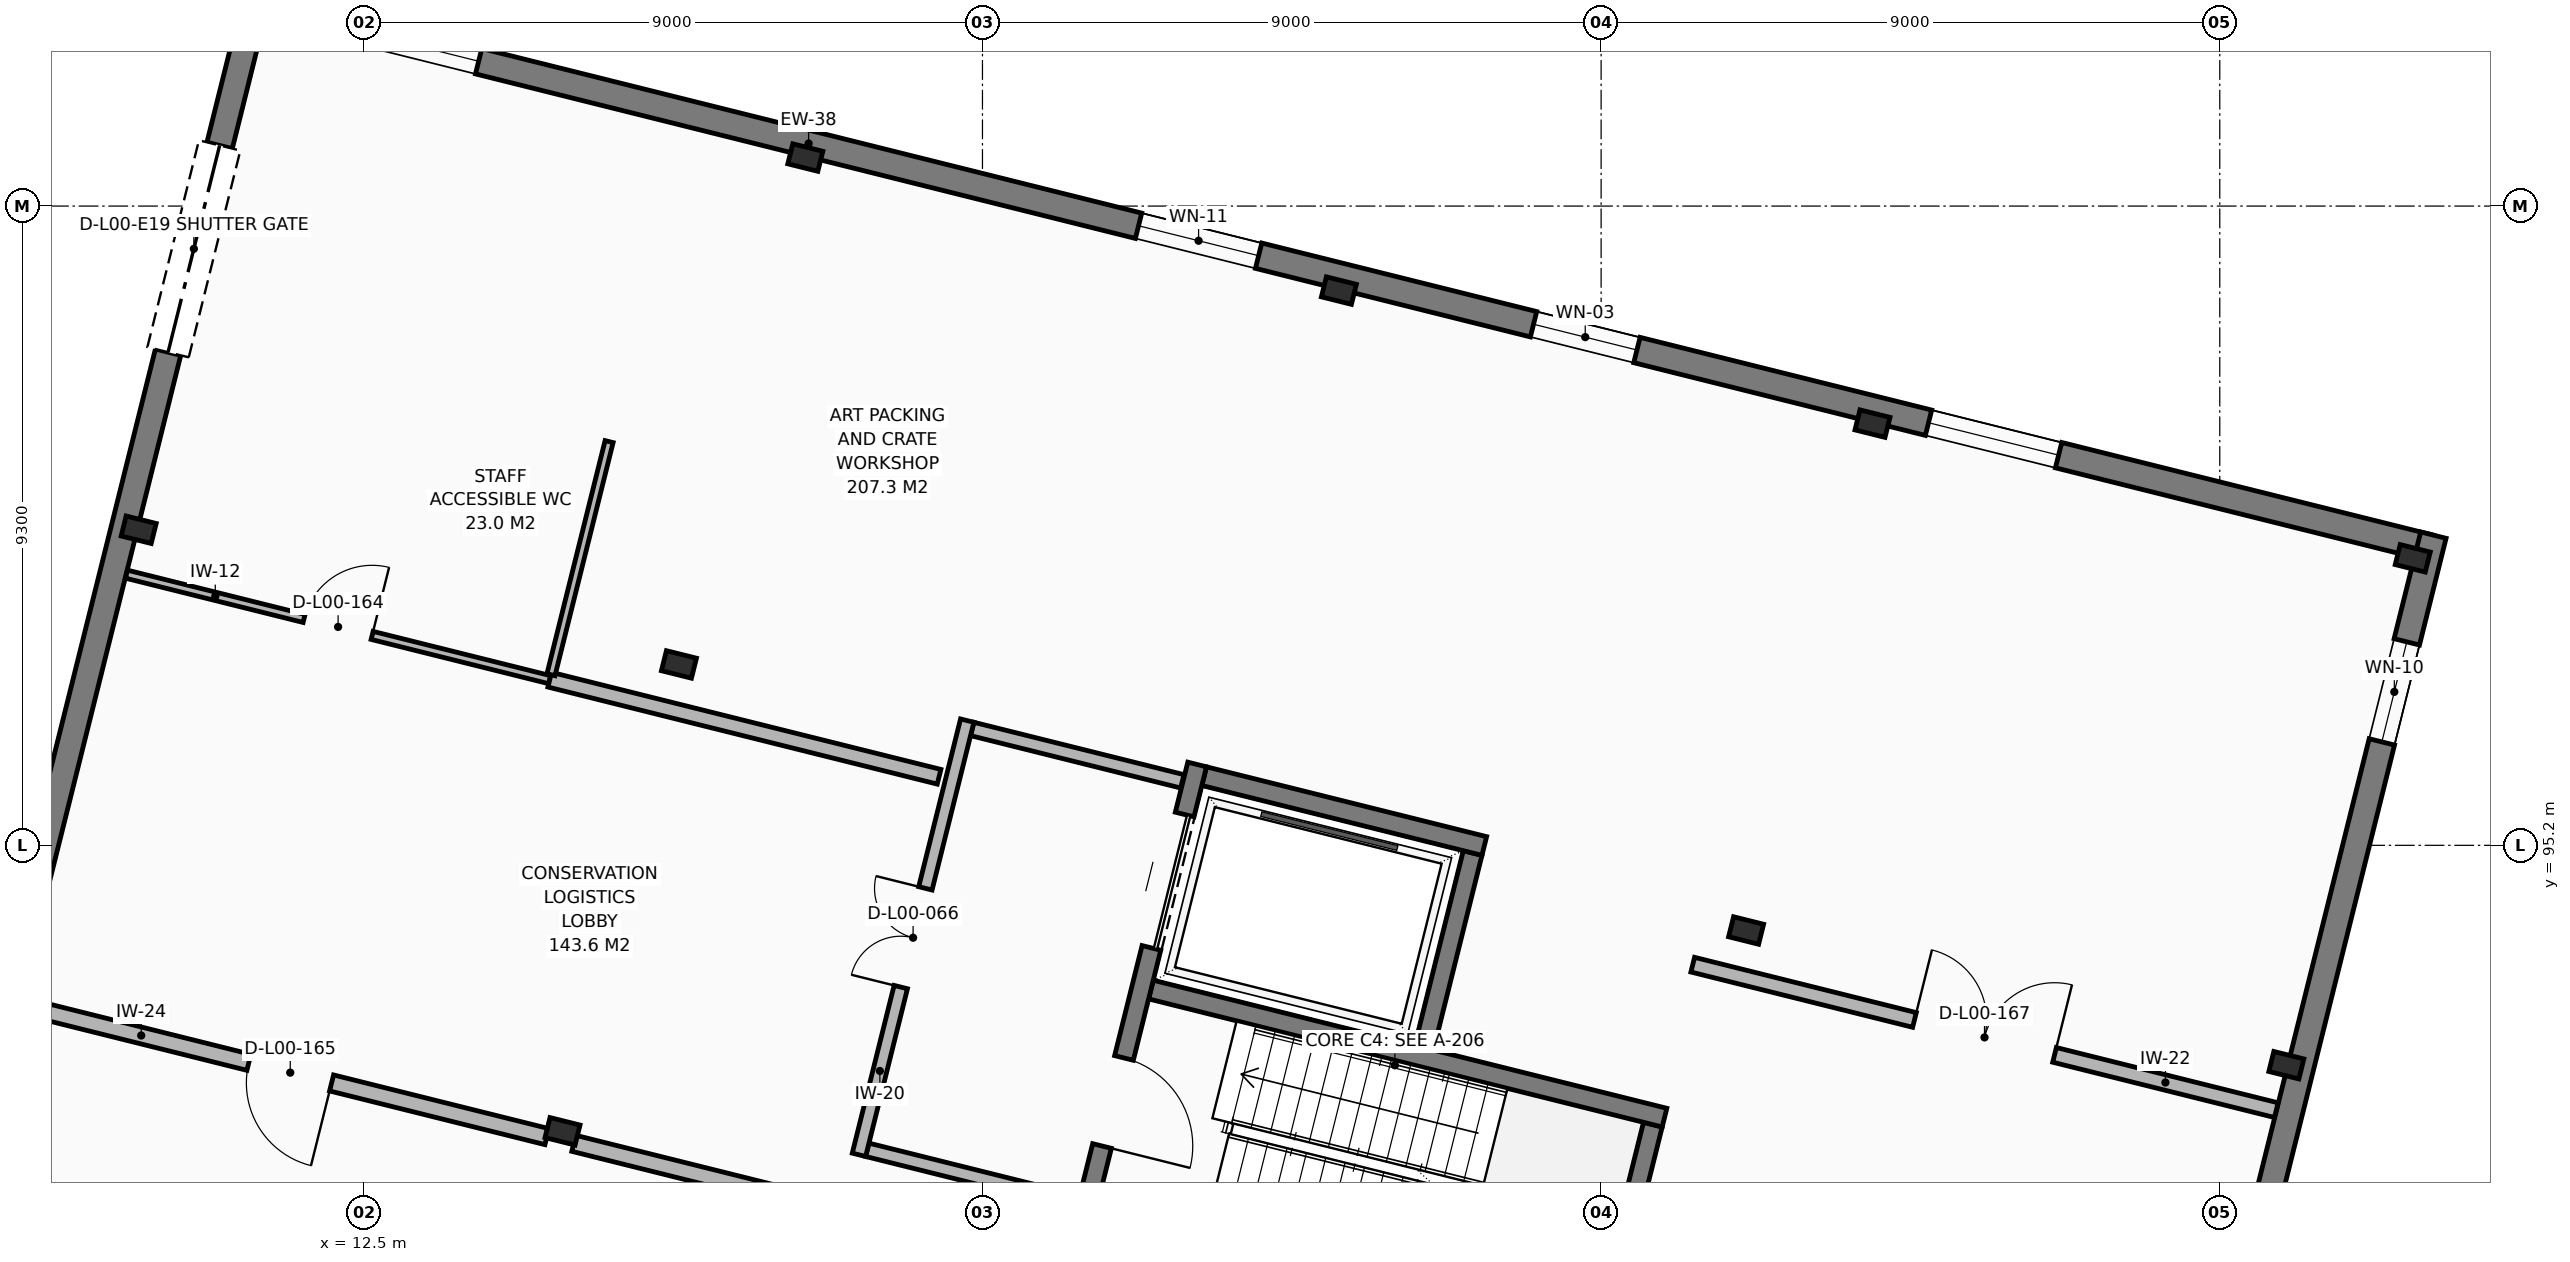
"""IFC4 building model, lengths in metres.
Left out: names, types, materials, properties, quantities, classifications, styles, units other than length and angle.
Written with IfcOpenShell. Run it as: python <this file> out.ifc"""

import sys

from ifc_helpers import new_model, si_unit, direction, frame, frame_2d, origin, origin_2d, place, context, subcontext, project, spatial, rectangle, i_section, extrude, element, fill, save


model = new_model("IFC4")
c1 = context("Model", 3, precision=1e-05, world=origin(), true_north=direction((0.0, 1.0)))
c2 = subcontext(c1, "Body", "Model", "MODEL_VIEW")
j1 = project(units=[si_unit("LENGTHUNIT", "METRE"), si_unit("PLANEANGLEUNIT", "RADIAN")], contexts=[c1])
p1 = place(None, origin())
s1 = spatial("IfcSite", under=j1, at=p1, CompositionType="ELEMENT")
p2 = place(p1, origin())
s2 = spatial("IfcBuilding", under=s1, at=p2, CompositionType="ELEMENT")
p3 = place(p2, origin())
s3 = spatial("IfcBuildingStorey", under=s2, at=p3, CompositionType="ELEMENT", Elevation=0.0)
for number, where, z_axis, x_axis in (
    (1, (9.225, 99.791, 0.0), (0.0, 0.0, 1.0), (0.97, -0.242, 0.0)),
    (2, (15.391, 91.039, 0.0), (0.0, 0.0, 1.0), (0.97, -0.242, 0.0)),
    (3, (17.084, 97.831, 0.0), (0.0, 0.0, 1.0), (0.97, -0.242, 0.0)),
    (4, (18.923, 105.206, 0.0), (0.0, 0.0, 1.0), (0.97, -0.242, 0.0)),
    (5, (26.685, 103.27, 0.0), (0.0, 0.0, 1.0), (0.97, -0.242, 0.0)),
    (6, (32.609, 93.961, 0.0), (0.0, 0.0, 1.0), (0.97, -0.242, 0.0)),
    (7, (34.448, 101.335, 0.0), (0.0, 0.0, 1.0), (0.97, -0.242, 0.0)),
    (8, (40.469, 92.001, 0.0), (0.0, 0.0, 1.0), (0.97, -0.242, 0.0)),
    (9, (42.307, 99.375, 0.0), (0.0, 0.0, 1.0), (0.97, -0.242, 0.0)),
):
    element("IfcColumn", number, at=place(p3, frame(where, z_axis=z_axis, x_axis=x_axis)), inside=s3, PredefinedType="COLUMN", context=c2, shape_type="SweptSolid", body=[
        extrude(i_section(OverallWidth=0.3, OverallDepth=0.45, WebThickness=0.014, FlangeThickness=0.026, FilletRadius=0.027, at=origin_2d()), origin(), (0.0, 0.0, 1.0), 5.1),
    ])
p4 = place(p3, frame((5.392, 85.287, 0.0), z_axis=(0.0, 0.0, 1.0), x_axis=(0.241923607661, 0.970295299409, 0.0)))
e10 = element("IfcWall", 10, at=p4, inside=s3, PredefinedType="SOLIDWALL", context=c2, shape_type="SweptSolid", body=[
    extrude(rectangle(XDim=22.81, YDim=0.38, at=frame_2d((11.405, 0.0))), origin(), (0.0, 0.0, 1.0), 4.88),
])
p5 = place(p4, frame((17.61, 0.0, 0.0)))
e11 = element("IfcOpeningElement", 11, at=p5, cuts=e10, PredefinedType="OPENING", context=c2, shape_type="SweptSolid", body=[
    extrude(rectangle(XDim=3.1, YDim=3.1, at=frame_2d((1.55, 1.55))), frame((0.0, 0.2, 0.0), z_axis=(0.0, -1.0, 0.0), x_axis=(1.0, 0.0, 0.0)), (0.0, 0.0, 1.0), 0.4),
])
p6 = place(p3, frame((10.726, 107.466, 0.0), z_axis=(0.0, 0.0, 1.0), x_axis=(0.970295504299, -0.2419227859, 0.0)))
e12 = element("IfcWall", 12, at=p6, inside=s3, PredefinedType="SOLIDWALL", context=c2, shape_type="SweptSolid", body=[
    extrude(rectangle(XDim=32.81, YDim=0.38, at=frame_2d((16.405, 0.0))), origin(), (0.0, 0.0, 1.0), 4.88),
])
p7 = place(p6, frame((1.6, 0.0, 0.85)))
e13 = element("IfcOpeningElement", 13, at=p7, cuts=e12, PredefinedType="OPENING", context=c2, shape_type="SweptSolid", body=[
    extrude(rectangle(XDim=1.95, YDim=1.5, at=frame_2d((0.975, 0.75))), frame((0.0, 0.2, 0.0), z_axis=(0.0, -1.0, 0.0), x_axis=(1.0, 0.0, 0.0)), (0.0, 0.0, 1.0), 0.4),
])
p8 = place(p6, frame((13.444, 0.0, 0.85)))
e14 = element("IfcOpeningElement", 14, at=p8, cuts=e12, PredefinedType="OPENING", context=c2, shape_type="SweptSolid", body=[
    extrude(rectangle(XDim=1.8, YDim=1.7, at=frame_2d((0.9, 0.85))), frame((0.0, 0.2, 0.0), z_axis=(0.0, -1.0, 0.0), x_axis=(1.0, 0.0, 0.0)), (0.0, 0.0, 1.0), 0.4),
])
p9 = place(p6, frame((19.366, 0.0, 0.85)))
e15 = element("IfcOpeningElement", 15, at=p9, cuts=e12, PredefinedType="OPENING", context=c2, shape_type="SweptSolid", body=[
    extrude(rectangle(XDim=1.55, YDim=1.5, at=frame_2d((0.775, 0.75))), frame((0.0, 0.2, 0.0), z_axis=(0.0, -1.0, 0.0), x_axis=(1.0, 0.0, 0.0)), (0.0, 0.0, 1.0), 0.4),
])
p10 = place(p6, frame((25.288, 0.0, 0.85)))
e16 = element("IfcOpeningElement", 16, at=p10, cuts=e12, PredefinedType="OPENING", context=c2, shape_type="SweptSolid", body=[
    extrude(rectangle(XDim=1.95, YDim=1.5, at=frame_2d((0.975, 0.75))), frame((0.0, 0.2, 0.0), z_axis=(0.0, -1.0, 0.0), x_axis=(1.0, 0.0, 0.0)), (0.0, 0.0, 1.0), 0.4),
])
p11 = place(p3, frame((42.608, 99.713, 0.0), z_axis=(0.0, 0.0, 1.0), x_axis=(-0.241914242385, -0.970297634405, 0.0)))
e17 = element("IfcWall", 17, at=p11, inside=s3, PredefinedType="SOLIDWALL", context=c2, shape_type="SweptSolid", body=[
    extrude(rectangle(XDim=14.978, YDim=0.38, at=frame_2d((7.489, 0.0))), origin(), (0.0, 0.0, 1.0), 4.88),
])
p12 = place(p11, frame((1.6, 0.0, 0.85)))
e18 = element("IfcOpeningElement", 18, at=p12, cuts=e17, PredefinedType="OPENING", context=c2, shape_type="SweptSolid", body=[
    extrude(rectangle(XDim=1.5, YDim=1.7, at=frame_2d((0.75, 0.85))), frame((0.0, 0.2, 0.0), z_axis=(0.0, -1.0, 0.0), x_axis=(1.0, 0.0, 0.0)), (0.0, 0.0, 1.0), 0.4),
])
p13 = place(p3, frame((30.508, 88.148, 0.0), z_axis=(0.0, 0.0, 1.0), x_axis=(0.241920098373, 0.970296174373, 0.0)))
e19 = element("IfcWall", 19, at=p13, inside=s3, PredefinedType="SHEAR", context=c2, shape_type="SweptSolid", body=[
    extrude(rectangle(XDim=3.08, YDim=0.28, at=frame_2d((1.54, 0.0))), origin(), (0.0, 0.0, 1.0), 4.88),
])
p14 = place(p3, frame((31.422, 91.239, 0.0), z_axis=(0.0, 0.0, 1.0), x_axis=(-0.970297102167, 0.241916377137, 0.0)))
e20 = element("IfcWall", 20, at=p14, inside=s3, PredefinedType="SHEAR", context=c2, shape_type="SweptSolid", body=[
    extrude(rectangle(XDim=7.7, YDim=0.28, at=frame_2d((3.85, 0.0))), origin(), (0.0, 0.0, 1.0), 4.88),
])
p15 = place(p3, frame((27.924, 92.255, 0.0), z_axis=(0.0, 0.0, 1.0), x_axis=(0.241886356621, 0.970304586447, 0.0)))
e21 = element("IfcWall", 21, at=p15, inside=s3, PredefinedType="SHEAR", context=c2, shape_type="SweptSolid", body=[
    extrude(rectangle(XDim=2.92, YDim=0.28, at=frame_2d((1.46, 0.0))), origin(), (0.0, 0.0, 1.0), 4.88),
])
p16 = place(p3, frame((28.8, 95.19, 0.0), z_axis=(0.0, 0.0, 1.0), x_axis=(-0.970292765557, 0.241933770084, 0.0)))
e22 = element("IfcWall", 22, at=p16, inside=s3, PredefinedType="SHEAR", context=c2, shape_type="SweptSolid", body=[
    extrude(rectangle(XDim=4.2, YDim=0.28, at=frame_2d((2.1, 0.0))), origin(), (0.0, 0.0, 1.0), 4.88),
])
p17 = place(p3, frame((24.623, 96.376, 0.0), z_axis=(0.0, 0.0, 1.0), x_axis=(-0.241922508616, -0.970295573434, 0.0)))
e23 = element("IfcWall", 23, at=p17, inside=s3, PredefinedType="SHEAR", context=c2, shape_type="SweptSolid", body=[
    extrude(rectangle(XDim=6.84, YDim=0.28, at=frame_2d((3.42, 0.0))), origin(), (0.0, 0.0, 1.0), 4.88),
])
p18 = place(p17, frame((0.75, 0.0, 0.0)))
e24 = element("IfcOpeningElement", 24, at=p18, cuts=e23, PredefinedType="OPENING", context=c2, shape_type="SweptSolid", body=[
    extrude(rectangle(XDim=2.0, YDim=2.3, at=frame_2d((1.0, 1.15))), frame((0.0, 0.15, 0.0), z_axis=(0.0, -1.0, 0.0), x_axis=(1.0, 0.0, 0.0)), (0.0, 0.0, 1.0), 0.3),
])
p19 = place(p17, frame((4.4, 0.0, 0.0)))
e25 = element("IfcOpeningElement", 25, at=p19, cuts=e23, PredefinedType="OPENING", context=c2, shape_type="SweptSolid", body=[
    extrude(rectangle(XDim=1.32, YDim=2.12, at=frame_2d((0.66, 1.06))), frame((0.0, 0.15, 0.0), z_axis=(0.0, -1.0, 0.0), x_axis=(1.0, 0.0, 0.0)), (0.0, 0.0, 1.0), 0.3),
])
p20 = place(p3, frame((19.824, 90.77, 0.0), z_axis=(0.0, 0.0, 1.0), x_axis=(0.970306396763, -0.241879094592, 0.0)))
e26 = element("IfcWall", 26, at=p20, inside=s3, PredefinedType="PARTITIONING", context=c2, shape_type="SweptSolid", body=[
    extrude(rectangle(XDim=3.15, YDim=0.2, at=frame_2d((1.575, 0.0))), origin(), (0.0, 0.0, 1.0), 4.88),
])
p21 = place(p3, frame((24.407, 96.131, 0.0), z_axis=(0.0, 0.0, 1.0), x_axis=(-0.970301862046, 0.241897285042, 0.0)))
e27 = element("IfcWall", 27, at=p21, inside=s3, PredefinedType="PARTITIONING", context=c2, shape_type="SweptSolid", body=[
    extrude(rectangle(XDim=3.15, YDim=0.2, at=frame_2d((1.575, 0.0))), origin(), (0.0, 0.0, 1.0), 4.37),
])
p22 = place(p3, frame((19.703, 90.698, 0.0), z_axis=(0.0, 0.0, 1.0), x_axis=(0.24192671796, 0.970294523914, 0.0)))
e28 = element("IfcWall", 28, at=p22, inside=s3, PredefinedType="PARTITIONING", context=c2, shape_type="SweptSolid", body=[
    extrude(rectangle(XDim=6.51, YDim=0.2, at=frame_2d((3.255, 0.0))), origin(), (0.0, 0.0, 1.0), 4.37),
])
p23 = place(p22, frame((2.515, 0.0, 0.0)))
e29 = element("IfcOpeningElement", 29, at=p23, cuts=e28, PredefinedType="OPENING", context=c2, shape_type="SweptSolid", body=[
    extrude(rectangle(XDim=1.48, YDim=2.15, at=frame_2d((0.74, 1.075))), frame((0.0, 0.11, 0.0), z_axis=(0.0, -1.0, 0.0), x_axis=(1.0, 0.0, 0.0)), (0.0, 0.0, 1.0), 0.22),
])
p24 = place(p3, frame((9.047, 99.145, 0.0), z_axis=(0.0, 0.0, 1.0), x_axis=(0.970298449516, -0.241910973021, 0.0)))
e30 = element("IfcWall", 30, at=p24, inside=s3, PredefinedType="PARTITIONING", context=c2, shape_type="SweptSolid", body=[
    extrude(rectangle(XDim=6.346, YDim=0.12, at=frame_2d((3.173, 0.0))), origin(), (0.0, 0.0, 1.0), 4.42),
])
p25 = place(p24, frame((2.663, 0.0, 0.0)))
e31 = element("IfcOpeningElement", 31, at=p25, cuts=e30, PredefinedType="OPENING", context=c2, shape_type="SweptSolid", body=[
    extrude(rectangle(XDim=1.02, YDim=2.12, at=frame_2d((0.51, 1.06))), frame((0.0, 0.07, 0.0), z_axis=(0.0, -1.0, 0.0), x_axis=(1.0, 0.0, 0.0)), (0.0, 0.0, 1.0), 0.14),
])
p26 = place(p3, frame((15.164, 90.962, 0.0), z_axis=(0.0, 0.0, 1.0), x_axis=(-0.970289717068, 0.24194599594, 0.0)))
e32 = element("IfcWall", 32, at=p26, inside=s3, PredefinedType="PARTITIONING", context=c2, shape_type="SweptSolid", body=[
    extrude(rectangle(XDim=7.697, YDim=0.24, at=frame_2d((3.849, 0.0))), origin(), (0.0, 0.0, 1.0), 4.37),
])
p27 = place(p26, frame((3.229, 0.0, 0.0)))
e33 = element("IfcOpeningElement", 33, at=p27, cuts=e32, PredefinedType="OPENING", context=c2, shape_type="SweptSolid", body=[
    extrude(rectangle(XDim=1.24, YDim=2.15, at=frame_2d((0.62, 1.075))), frame((0.0, 0.13, 0.0), z_axis=(0.0, -1.0, 0.0), x_axis=(1.0, 0.0, 0.0)), (0.0, 0.0, 1.0), 0.26),
])
p28 = place(p3, frame((20.24, 89.696, 0.0), z_axis=(0.0, 0.0, 1.0), x_axis=(-0.970291030499, 0.241940728553, 0.0)))
e34 = element("IfcWall", 34, at=p28, inside=s3, PredefinedType="PARTITIONING", context=c2, shape_type="SweptSolid", body=[
    extrude(rectangle(XDim=4.829, YDim=0.24, at=frame_2d((2.414, 0.0))), origin(), (0.0, 0.0, 1.0), 4.37),
])
p29 = place(p3, frame((31.833, 93.464, 0.0), z_axis=(0.0, 0.0, 1.0), x_axis=(0.970299874482, -0.241905257445, 0.0)))
e35 = element("IfcWall", 35, at=p29, inside=s3, PredefinedType="PARTITIONING", context=c2, shape_type="SweptSolid", body=[
    extrude(rectangle(XDim=8.749, YDim=0.22, at=frame_2d((4.375, 0.0))), origin(), (0.0, 0.0, 1.0), 4.42),
])
p30 = place(p29, frame((3.324, 0.0, 0.0)))
e36 = element("IfcOpeningElement", 36, at=p30, cuts=e35, PredefinedType="OPENING", context=c2, shape_type="SweptSolid", body=[
    extrude(rectangle(XDim=2.1, YDim=2.25, at=frame_2d((1.05, 1.125))), frame((0.0, 0.12, 0.0), z_axis=(0.0, -1.0, 0.0), x_axis=(1.0, 0.0, 0.0)), (0.0, 0.0, 1.0), 0.24),
])
p31 = place(p3, frame((15.205, 97.61, 0.0), z_axis=(0.0, 0.0, 1.0), x_axis=(0.970294852546, -0.241925399911, 0.0)))
e37 = element("IfcWall", 37, at=p31, inside=s3, PredefinedType="PARTITIONING", context=c2, shape_type="SweptSolid", body=[
    extrude(rectangle(XDim=5.837, YDim=0.22, at=frame_2d((2.918, 0.0))), origin(), (0.0, 0.0, 1.0), 4.42),
])
p32 = place(p3, frame((16.069, 101.073, 0.0), z_axis=(0.0, 0.0, 1.0), x_axis=(-0.241976747044, -0.970282048628, 0.0)))
e38 = element("IfcWall", 38, at=p32, inside=s3, PredefinedType="PARTITIONING", context=c2, shape_type="SweptSolid", body=[
    extrude(rectangle(XDim=3.495, YDim=0.12, at=frame_2d((1.748, 0.0))), origin(), (0.0, 0.0, 1.0), 4.37),
])
p33 = place(p5, origin())
e39 = element("IfcDoor", 39, at=p33, inside=s3, OperationType="ROLLINGUP", PredefinedType="GATE", context=c2, shape_type="SweptSolid", body=[
    extrude(rectangle(XDim=3.1, YDim=3.1, at=frame_2d((1.55, 1.55))), frame((0.0, 0.025, 0.0), z_axis=(0.0, -1.0, 0.0), x_axis=(1.0, 0.0, 0.0)), (0.0, 0.0, 1.0), 0.05),
])
fill(e11, e39)
p34 = place(p7, origin())
e40 = element("IfcWindow", 40, at=p34, inside=s3, PartitioningType="SINGLE_PANEL", PredefinedType="WINDOW", context=c2, shape_type="SweptSolid", body=[
    extrude(rectangle(XDim=1.95, YDim=1.5, at=frame_2d((0.975, 0.75))), frame((0.0, 0.03, 0.0), z_axis=(0.0, -1.0, 0.0), x_axis=(1.0, 0.0, 0.0)), (0.0, 0.0, 1.0), 0.06),
])
fill(e13, e40)
p35 = place(p8, origin())
e41 = element("IfcWindow", 41, at=p35, inside=s3, PartitioningType="SINGLE_PANEL", PredefinedType="WINDOW", context=c2, shape_type="SweptSolid", body=[
    extrude(rectangle(XDim=1.8, YDim=1.7, at=frame_2d((0.9, 0.85))), frame((0.0, 0.03, 0.0), z_axis=(0.0, -1.0, 0.0), x_axis=(1.0, 0.0, 0.0)), (0.0, 0.0, 1.0), 0.06),
])
fill(e14, e41)
p36 = place(p9, origin())
e42 = element("IfcWindow", 42, at=p36, inside=s3, PartitioningType="SINGLE_PANEL", PredefinedType="WINDOW", context=c2, shape_type="SweptSolid", body=[
    extrude(rectangle(XDim=1.55, YDim=1.5, at=frame_2d((0.775, 0.75))), frame((0.0, 0.03, 0.0), z_axis=(0.0, -1.0, 0.0), x_axis=(1.0, 0.0, 0.0)), (0.0, 0.0, 1.0), 0.06),
])
fill(e15, e42)
p37 = place(p10, origin())
e43 = element("IfcWindow", 43, at=p37, inside=s3, PartitioningType="SINGLE_PANEL", PredefinedType="WINDOW", context=c2, shape_type="SweptSolid", body=[
    extrude(rectangle(XDim=1.95, YDim=1.5, at=frame_2d((0.975, 0.75))), frame((0.0, 0.03, 0.0), z_axis=(0.0, -1.0, 0.0), x_axis=(1.0, 0.0, 0.0)), (0.0, 0.0, 1.0), 0.06),
])
fill(e16, e43)
p38 = place(p12, origin())
e44 = element("IfcWindow", 44, at=p38, inside=s3, PartitioningType="SINGLE_PANEL", PredefinedType="WINDOW", context=c2, shape_type="SweptSolid", body=[
    extrude(rectangle(XDim=1.5, YDim=1.7, at=frame_2d((0.75, 0.85))), frame((0.0, 0.03, 0.0), z_axis=(0.0, -1.0, 0.0), x_axis=(1.0, 0.0, 0.0)), (0.0, 0.0, 1.0), 0.06),
])
fill(e18, e44)
p39 = place(p18, origin())
e45 = element("IfcDoor", 45, at=p39, inside=s3, OperationType="SLIDING_TO_LEFT", PredefinedType="DOOR", context=c2, shape_type="SweptSolid", body=[
    extrude(rectangle(XDim=2.0, YDim=2.3, at=frame_2d((1.0, 1.15))), frame((0.0, 0.025, 0.0), z_axis=(0.0, -1.0, 0.0), x_axis=(1.0, 0.0, 0.0)), (0.0, 0.0, 1.0), 0.05),
])
fill(e24, e45)
p40 = place(p19, origin())
e46 = element("IfcDoor", 46, at=p40, inside=s3, OperationType="SINGLE_SWING_RIGHT", PredefinedType="DOOR", context=c2, shape_type="SweptSolid", body=[
    extrude(rectangle(XDim=1.32, YDim=2.12, at=frame_2d((0.66, 1.06))), frame((0.0, 0.025, 0.0), z_axis=(0.0, -1.0, 0.0), x_axis=(1.0, 0.0, 0.0)), (0.0, 0.0, 1.0), 0.05),
])
fill(e25, e46)
p41 = place(p23, origin())
e47 = element("IfcDoor", 47, at=p41, inside=s3, OperationType="DOUBLE_DOOR_SINGLE_SWING", PredefinedType="DOOR", context=c2, shape_type="SweptSolid", body=[
    extrude(rectangle(XDim=1.48, YDim=2.15, at=frame_2d((0.74, 1.075))), frame((0.0, 0.025, 0.0), z_axis=(0.0, -1.0, 0.0), x_axis=(1.0, 0.0, 0.0)), (0.0, 0.0, 1.0), 0.05),
])
fill(e29, e47)
p42 = place(p25, origin())
e48 = element("IfcDoor", 48, at=p42, inside=s3, OperationType="SINGLE_SWING_RIGHT", PredefinedType="DOOR", context=c2, shape_type="SweptSolid", body=[
    extrude(rectangle(XDim=1.02, YDim=2.12, at=frame_2d((0.51, 1.06))), frame((0.0, 0.025, 0.0), z_axis=(0.0, -1.0, 0.0), x_axis=(1.0, 0.0, 0.0)), (0.0, 0.0, 1.0), 0.05),
])
fill(e31, e48)
p43 = place(p27, origin())
e49 = element("IfcDoor", 49, at=p43, inside=s3, OperationType="SINGLE_SWING_LEFT", PredefinedType="DOOR", context=c2, shape_type="SweptSolid", body=[
    extrude(rectangle(XDim=1.24, YDim=2.15, at=frame_2d((0.62, 1.075))), frame((0.0, 0.025, 0.0), z_axis=(0.0, -1.0, 0.0), x_axis=(1.0, 0.0, 0.0)), (0.0, 0.0, 1.0), 0.05),
])
fill(e33, e49)
p44 = place(p30, origin())
e50 = element("IfcDoor", 50, at=p44, inside=s3, OperationType="DOUBLE_DOOR_SINGLE_SWING", PredefinedType="DOOR", context=c2, shape_type="SweptSolid", body=[
    extrude(rectangle(XDim=2.1, YDim=2.25, at=frame_2d((1.05, 1.125))), frame((0.0, 0.025, 0.0), z_axis=(0.0, -1.0, 0.0), x_axis=(1.0, 0.0, 0.0)), (0.0, 0.0, 1.0), 0.05),
])
fill(e36, e50)
save(model, sys.argv[1])
